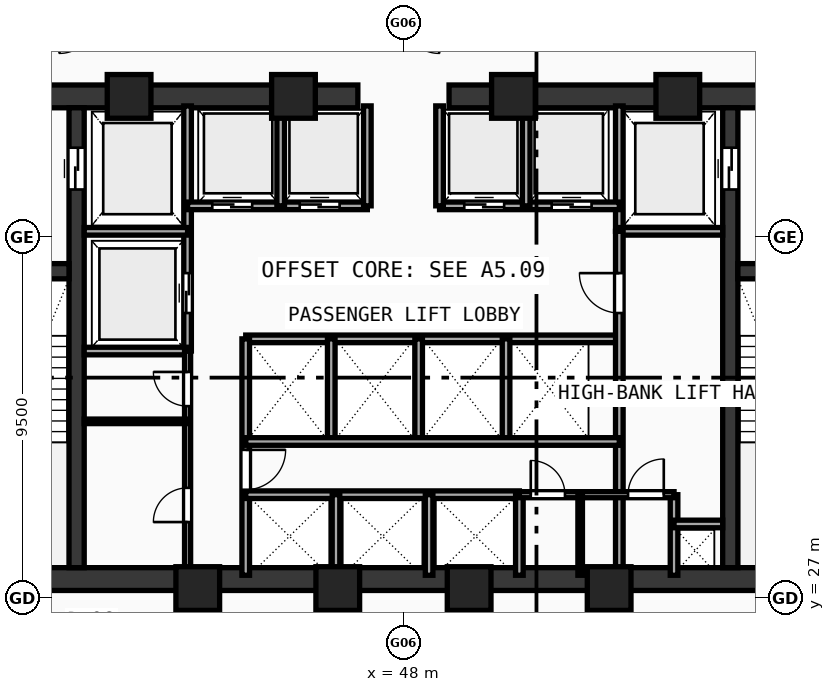
"""IFC4 building model, lengths in metres.
Left out: names, types, materials, properties, quantities, classifications, styles, units other than length and angle.
Written with IfcOpenShell. Run it as: python <this file> out.ifc"""

import sys

from ifc_helpers import new_model, si_unit, direction, frame, frame_2d, origin, origin_with_axes, origin_2d, place, context, subcontext, project, spatial, rectangle, hollow_rectangle, extrude, source, transform, mapped, element, fill, save


model = new_model("IFC4")
c1 = context("Model", 3, precision=1e-05, world=origin(), true_north=direction((0.0, 1.0)))
c2 = subcontext(c1, "Body", "Model", "MODEL_VIEW")
j1 = project(units=[si_unit("LENGTHUNIT", "METRE"), si_unit("PLANEANGLEUNIT", "RADIAN")], contexts=[c1])
p1 = place(None, origin())
s1 = spatial("IfcSite", under=j1, at=p1, CompositionType="ELEMENT")
p2 = place(p1, origin())
s2 = spatial("IfcBuilding", under=s1, at=p2, CompositionType="ELEMENT")
p3 = place(p2, frame((0.0, 0.0, 111.58)))
s3 = spatial("IfcBuildingStorey", under=s2, at=p3, CompositionType="ELEMENT", Elevation=111.58)
p4 = place(p3, frame((35.5, 27.5, 0.0), z_axis=(0.0, 0.0, 1.0), x_axis=(1.0, 0.0, 0.0)))
e1 = element("IfcWall", 1, at=p4, inside=s3, PredefinedType="SHEAR", context=c2, shape_type="SweptSolid", body=[
    extrude(rectangle(XDim=25.0, YDim=0.6, at=frame_2d((12.5, 0.0))), origin(), (0.0, 0.0, 1.0), 3.54),
])
p5 = place(p3, frame((35.5, 40.2, 0.0), z_axis=(0.0, 0.0, 1.0), x_axis=(1.0, 0.0, 0.0)))
e2 = element("IfcWall", 2, at=p5, inside=s3, PredefinedType="SHEAR", context=c2, shape_type="SweptSolid", body=[
    extrude(rectangle(XDim=11.3, YDim=0.6, at=frame_2d((5.65, 0.0))), origin(), (0.0, 0.0, 1.0), 3.54),
])
p6 = place(p5, frame((1.65, 0.0, 0.0)))
e3 = element("IfcOpeningElement", 3, at=p6, cuts=e2, PredefinedType="OPENING", context=c2, shape_type="SweptSolid", body=[
    extrude(rectangle(XDim=1.05, YDim=2.1, at=frame_2d((0.525, 1.05))), frame((0.0, 0.31, 0.0), z_axis=(0.0, -1.0, 0.0), x_axis=(1.0, 0.0, 0.0)), (0.0, 0.0, 1.0), 0.62),
])
p7 = place(p3, frame((49.2, 40.2, 0.0), z_axis=(0.0, 0.0, 1.0), x_axis=(1.0, 0.0, 0.0)))
e4 = element("IfcWall", 4, at=p7, inside=s3, PredefinedType="SHEAR", context=c2, shape_type="SweptSolid", body=[
    extrude(rectangle(XDim=11.3, YDim=0.6, at=frame_2d((5.65, 0.0))), origin(), (0.0, 0.0, 1.0), 3.54),
])
p8 = place(p7, frame((8.6, 0.0, 0.0)))
e5 = element("IfcOpeningElement", 5, at=p8, cuts=e4, PredefinedType="OPENING", context=c2, shape_type="SweptSolid", body=[
    extrude(rectangle(XDim=1.05, YDim=2.1, at=frame_2d((0.525, 1.05))), frame((0.0, 0.31, 0.0), z_axis=(0.0, -1.0, 0.0), x_axis=(1.0, 0.0, 0.0)), (0.0, 0.0, 1.0), 0.62),
])
p9 = place(p3, frame((39.4, 27.8, 0.0), z_axis=(0.0, 0.0, 1.0), x_axis=(0.0, 1.0, 0.0)))
e6 = element("IfcWall", 6, at=p9, inside=s3, PredefinedType="SHEAR", context=c2, shape_type="SweptSolid", body=[
    extrude(rectangle(XDim=12.1, YDim=0.4, at=frame_2d((6.05, 0.0))), origin(), (0.0, 0.0, 1.0), 3.54),
])
p10 = place(p9, frame((9.95, 0.0, 0.0)))
e7 = element("IfcOpeningElement", 7, at=p10, cuts=e6, PredefinedType="OPENING", context=c2, shape_type="SweptSolid", body=[
    extrude(rectangle(XDim=1.1, YDim=2.1, at=frame_2d((0.55, 1.05))), frame((0.0, 0.21, 0.0), z_axis=(0.0, -1.0, 0.0), x_axis=(1.0, 0.0, 0.0)), (0.0, 0.0, 1.0), 0.42),
])
p11 = place(p3, frame((56.6, 27.8, 0.0), z_axis=(0.0, 0.0, 1.0), x_axis=(0.0, 1.0, 0.0)))
e8 = element("IfcWall", 8, at=p11, inside=s3, PredefinedType="SHEAR", context=c2, shape_type="SweptSolid", body=[
    extrude(rectangle(XDim=12.1, YDim=0.4, at=frame_2d((6.05, 0.0))), origin(), (0.0, 0.0, 1.0), 3.54),
])
p12 = place(p11, frame((9.95, 0.0, 0.0)))
e9 = element("IfcOpeningElement", 9, at=p12, cuts=e8, PredefinedType="OPENING", context=c2, shape_type="SweptSolid", body=[
    extrude(rectangle(XDim=1.1, YDim=2.1, at=frame_2d((0.55, 1.05))), frame((0.0, 0.21, 0.0), z_axis=(0.0, -1.0, 0.0), x_axis=(1.0, 0.0, 0.0)), (0.0, 0.0, 1.0), 0.42),
])
p13 = place(p3, frame((36.1, 35.6, 0.0), z_axis=(0.0, 0.0, 1.0), x_axis=(1.0, 0.0, 0.0)))
e10 = element("IfcWall", 10, at=p13, inside=s3, PredefinedType="SHEAR", context=c2, shape_type="SweptSolid", body=[
    extrude(rectangle(XDim=3.1, YDim=0.4, at=frame_2d((1.55, 0.0))), origin(), (0.0, 0.0, 1.0), 3.54),
])
p14 = place(p13, frame((1.02, 0.0, 0.0)))
e11 = element("IfcOpeningElement", 11, at=p14, cuts=e10, PredefinedType="OPENING", context=c2, shape_type="SweptSolid", body=[
    extrude(rectangle(XDim=1.05, YDim=2.1, at=frame_2d((0.525, 1.05))), frame((0.0, 0.21, 0.0), z_axis=(0.0, -1.0, 0.0), x_axis=(1.0, 0.0, 0.0)), (0.0, 0.0, 1.0), 0.42),
])
p15 = place(p3, frame((56.8, 35.6, 0.0), z_axis=(0.0, 0.0, 1.0), x_axis=(1.0, 0.0, 0.0)))
e12 = element("IfcWall", 12, at=p15, inside=s3, PredefinedType="SHEAR", context=c2, shape_type="SweptSolid", body=[
    extrude(rectangle(XDim=3.1, YDim=0.4, at=frame_2d((1.55, 0.0))), origin(), (0.0, 0.0, 1.0), 3.54),
])
p16 = place(p15, frame((1.02, 0.0, 0.0)))
e13 = element("IfcOpeningElement", 13, at=p16, cuts=e12, PredefinedType="OPENING", context=c2, shape_type="SweptSolid", body=[
    extrude(rectangle(XDim=1.05, YDim=2.1, at=frame_2d((0.525, 1.05))), frame((0.0, 0.21, 0.0), z_axis=(0.0, -1.0, 0.0), x_axis=(1.0, 0.0, 0.0)), (0.0, 0.0, 1.0), 0.42),
])
m1 = source(origin(), c2, "Body", "SweptSolid", [
    extrude(hollow_rectangle(XDim=1.15, YDim=1.15, WallThickness=0.048, at=origin_2d()), origin(), (0.0, 0.0, 1.0), 3.8),
])
for number, where, z_axis, x_axis in (
    (14, (42.588, 27.25, -0.26), (0.0, 0.0, 1.0), (1.0, 0.0, 0.0)),
    (15, (46.272, 27.25, -0.26), (0.0, 0.0, 1.0), (1.0, 0.0, 0.0)),
    (16, (49.729, 27.25, -0.26), (0.0, 0.0, 1.0), (1.0, 0.0, 0.0)),
    (17, (53.412, 27.25, -0.26), (0.0, 0.0, 1.0), (1.0, 0.0, 0.0)),
    (18, (55.219, 40.2, -0.26), (0.0, 0.0, 1.0), (1.0, 0.0, 0.0)),
    (19, (50.894, 40.2, -0.26), (0.0, 0.0, 1.0), (1.0, 0.0, 0.0)),
    (20, (45.106, 40.2, -0.26), (0.0, 0.0, 1.0), (1.0, 0.0, 0.0)),
    (21, (40.781, 40.2, -0.26), (0.0, 0.0, 1.0), (1.0, 0.0, 0.0)),
):
    element("IfcColumn", number, at=place(p3, frame(where, z_axis=z_axis, x_axis=x_axis)), inside=s3, PredefinedType="COLUMN", context=c2, shape_type="MappedRepresentation", body=[
        mapped(m1, transform((0.0, 0.0, 0.0), scale=1.0)),
    ])
p17 = place(p3, frame((42.32, 33.5, 0.0), z_axis=(0.0, 0.0, 1.0), x_axis=(0.0, 1.0, 0.0)))
e22 = element("IfcWall", 22, at=p17, inside=s3, PredefinedType="SOLIDWALL", context=c2, shape_type="SweptSolid", body=[
    extrude(rectangle(XDim=6.45, YDim=0.2, at=frame_2d((3.225, 0.0))), origin(), (0.0, 0.0, 1.0), 3.54),
])
p18 = place(p17, frame((1.0, 0.0, 0.0)))
e23 = element("IfcOpeningElement", 23, at=p18, cuts=e22, PredefinedType="OPENING", context=c2, shape_type="SweptSolid", body=[
    extrude(rectangle(XDim=1.05, YDim=2.1, at=frame_2d((0.525, 1.05))), frame((0.0, 0.11, 0.0), z_axis=(0.0, -1.0, 0.0), x_axis=(1.0, 0.0, 0.0)), (0.0, 0.0, 1.0), 0.22),
])
for number, where, z_axis, x_axis in (
    (24, (39.6, 36.65, 0.0), (0.0, 0.0, 1.0), (1.0, 0.0, 0.0)),
    (25, (39.6, 33.5, 0.0), (0.0, 0.0, 1.0), (1.0, 0.0, 0.0)),
):
    element("IfcWall", number, at=place(p3, frame(where, z_axis=z_axis, x_axis=x_axis)), inside=s3, PredefinedType="SOLIDWALL", context=c2, shape_type="SweptSolid", body=[
        extrude(rectangle(XDim=2.72, YDim=0.2, at=frame_2d((1.36, 0.0))), origin(), (0.0, 0.0, 1.0), 3.54),
    ])
p19 = place(p3, frame((53.68, 36.65, 0.0), z_axis=(0.0, 0.0, 1.0), x_axis=(0.0, 1.0, 0.0)))
e26 = element("IfcWall", 26, at=p19, inside=s3, PredefinedType="SOLIDWALL", context=c2, shape_type="SweptSolid", body=[
    extrude(rectangle(XDim=3.3, YDim=0.2, at=frame_2d((1.65, 0.0))), origin(), (0.0, 0.0, 1.0), 3.54),
])
p20 = place(p3, frame((53.68, 36.65, 0.0), z_axis=(0.0, 0.0, 1.0), x_axis=(1.0, 0.0, 0.0)))
e27 = element("IfcWall", 27, at=p20, inside=s3, PredefinedType="SOLIDWALL", context=c2, shape_type="SweptSolid", body=[
    extrude(rectangle(XDim=2.72, YDim=0.2, at=frame_2d((1.36, 0.0))), origin(), (0.0, 0.0, 1.0), 3.54),
])
p21 = place(p3, frame((42.32, 37.32, 0.0), z_axis=(0.0, 0.0, 1.0), x_axis=(1.0, 0.0, 0.0)))
e28 = element("IfcWall", 28, at=p21, inside=s3, PredefinedType="SOLIDWALL", context=c2, shape_type="SweptSolid", body=[
    extrude(rectangle(XDim=4.73, YDim=0.2, at=frame_2d((2.365, 0.0))), origin(), (0.0, 0.0, 1.0), 3.54),
])
p22 = place(p21, frame((0.65, 0.0, 0.0)))
e29 = element("IfcOpeningElement", 29, at=p22, cuts=e28, PredefinedType="OPENING", context=c2, shape_type="SweptSolid", body=[
    extrude(rectangle(XDim=1.05, YDim=2.1, at=frame_2d((0.525, 1.05))), frame((0.0, 0.11, 0.0), z_axis=(0.0, -1.0, 0.0), x_axis=(1.0, 0.0, 0.0)), (0.0, 0.0, 1.0), 0.22),
])
p23 = place(p21, frame((2.95, 0.0, 0.0)))
e30 = element("IfcOpeningElement", 30, at=p23, cuts=e28, PredefinedType="OPENING", context=c2, shape_type="SweptSolid", body=[
    extrude(rectangle(XDim=1.05, YDim=2.1, at=frame_2d((0.525, 1.05))), frame((0.0, 0.11, 0.0), z_axis=(0.0, -1.0, 0.0), x_axis=(1.0, 0.0, 0.0)), (0.0, 0.0, 1.0), 0.22),
])
p24 = place(p3, frame((48.95, 37.32, 0.0), z_axis=(0.0, 0.0, 1.0), x_axis=(1.0, 0.0, 0.0)))
e31 = element("IfcWall", 31, at=p24, inside=s3, PredefinedType="SOLIDWALL", context=c2, shape_type="SweptSolid", body=[
    extrude(rectangle(XDim=4.73, YDim=0.2, at=frame_2d((2.365, 0.0))), origin(), (0.0, 0.0, 1.0), 3.54),
])
p25 = place(p24, frame((0.65, 0.0, 0.0)))
e32 = element("IfcOpeningElement", 32, at=p25, cuts=e31, PredefinedType="OPENING", context=c2, shape_type="SweptSolid", body=[
    extrude(rectangle(XDim=1.05, YDim=2.1, at=frame_2d((0.525, 1.05))), frame((0.0, 0.11, 0.0), z_axis=(0.0, -1.0, 0.0), x_axis=(1.0, 0.0, 0.0)), (0.0, 0.0, 1.0), 0.22),
])
p26 = place(p24, frame((2.95, 0.0, 0.0)))
e33 = element("IfcOpeningElement", 33, at=p26, cuts=e31, PredefinedType="OPENING", context=c2, shape_type="SweptSolid", body=[
    extrude(rectangle(XDim=1.05, YDim=2.1, at=frame_2d((0.525, 1.05))), frame((0.0, 0.11, 0.0), z_axis=(0.0, -1.0, 0.0), x_axis=(1.0, 0.0, 0.0)), (0.0, 0.0, 1.0), 0.22),
])
for number, where, z_axis, x_axis in (
    (34, (47.05, 37.32, 0.0), (0.0, 0.0, 1.0), (0.0, 1.0, 0.0)),
    (35, (48.95, 37.32, 0.0), (0.0, 0.0, 1.0), (0.0, 1.0, 0.0)),
    (36, (44.77, 37.32, 0.0), (0.0, 0.0, 1.0), (0.0, 1.0, 0.0)),
    (37, (51.23, 37.32, 0.0), (0.0, 0.0, 1.0), (0.0, 1.0, 0.0)),
):
    element("IfcWall", number, at=place(p3, frame(where, z_axis=z_axis, x_axis=x_axis)), inside=s3, PredefinedType="SOLIDWALL", context=c2, shape_type="SweptSolid", body=[
        extrude(rectangle(XDim=2.63, YDim=0.2, at=frame_2d((1.315, 0.0))), origin(), (0.0, 0.0, 1.0), 3.54),
    ])
p27 = place(p3, frame((43.85, 33.82, 0.0), z_axis=(0.0, 0.0, 1.0), x_axis=(1.0, 0.0, 0.0)))
e38 = element("IfcWall", 38, at=p27, inside=s3, PredefinedType="SOLIDWALL", context=c2, shape_type="SweptSolid", body=[
    extrude(rectangle(XDim=9.83, YDim=0.2, at=frame_2d((4.915, 0.0))), origin(), (0.0, 0.0, 1.0), 3.54),
])
p28 = place(p3, frame((43.85, 27.6, 0.0), z_axis=(0.0, 0.0, 1.0), x_axis=(0.0, 1.0, 0.0)))
e39 = element("IfcWall", 39, at=p28, inside=s3, PredefinedType="SOLIDWALL", context=c2, shape_type="SweptSolid", body=[
    extrude(rectangle(XDim=6.22, YDim=0.2, at=frame_2d((3.11, 0.0))), origin(), (0.0, 0.0, 1.0), 3.54),
])
p29 = place(p28, frame((2.25, 0.0, 0.0)))
e40 = element("IfcOpeningElement", 40, at=p29, cuts=e39, PredefinedType="OPENING", context=c2, shape_type="SweptSolid", body=[
    extrude(rectangle(XDim=1.05, YDim=2.1, at=frame_2d((0.525, 1.05))), frame((0.0, 0.11, 0.0), z_axis=(0.0, -1.0, 0.0), x_axis=(1.0, 0.0, 0.0)), (0.0, 0.0, 1.0), 0.22),
])
p30 = place(p3, frame((53.68, 27.6, 0.0), z_axis=(0.0, 0.0, 1.0), x_axis=(0.0, 1.0, 0.0)))
e41 = element("IfcWall", 41, at=p30, inside=s3, PredefinedType="SOLIDWALL", context=c2, shape_type="SweptSolid", body=[
    extrude(rectangle(XDim=9.05, YDim=0.2, at=frame_2d((4.525, 0.0))), origin(), (0.0, 0.0, 1.0), 3.54),
])
p31 = place(p30, frame((6.9, 0.0, 0.0)))
e42 = element("IfcOpeningElement", 42, at=p31, cuts=e41, PredefinedType="OPENING", context=c2, shape_type="SweptSolid", body=[
    extrude(rectangle(XDim=1.05, YDim=2.1, at=frame_2d((0.525, 1.05))), frame((0.0, 0.11, 0.0), z_axis=(0.0, -1.0, 0.0), x_axis=(1.0, 0.0, 0.0)), (0.0, 0.0, 1.0), 0.22),
])
for number, where, z_axis, x_axis in (
    (43, (46.1, 31.12, 0.0), (0.0, 0.0, 1.0), (0.0, 1.0, 0.0)),
    (44, (48.4, 31.12, 0.0), (0.0, 0.0, 1.0), (0.0, 1.0, 0.0)),
    (45, (50.7, 31.12, 0.0), (0.0, 0.0, 1.0), (0.0, 1.0, 0.0)),
):
    element("IfcWall", number, at=place(p3, frame(where, z_axis=z_axis, x_axis=x_axis)), inside=s3, PredefinedType="SOLIDWALL", context=c2, shape_type="SweptSolid", body=[
        extrude(rectangle(XDim=2.7, YDim=0.2, at=frame_2d((1.35, 0.0))), origin(), (0.0, 0.0, 1.0), 3.54),
    ])
p32 = place(p3, frame((43.85, 29.72, 0.0), z_axis=(0.0, 0.0, 1.0), x_axis=(1.0, 0.0, 0.0)))
e46 = element("IfcWall", 46, at=p32, inside=s3, PredefinedType="SOLIDWALL", context=c2, shape_type="SweptSolid", body=[
    extrude(rectangle(XDim=7.2, YDim=0.2, at=frame_2d((3.6, 0.0))), origin(), (0.0, 0.0, 1.0), 3.54),
])
p33 = place(p3, frame((51.05, 27.6, 0.0), z_axis=(0.0, 0.0, 1.0), x_axis=(0.0, 1.0, 0.0)))
e47 = element("IfcWall", 47, at=p33, inside=s3, PredefinedType="SOLIDWALL", context=c2, shape_type="SweptSolid", body=[
    extrude(rectangle(XDim=2.12, YDim=0.2, at=frame_2d((1.06, 0.0))), origin(), (0.0, 0.0, 1.0), 3.54),
])
p34 = place(p3, frame((43.85, 31.12, 0.0), z_axis=(0.0, 0.0, 1.0), x_axis=(1.0, 0.0, 0.0)))
e48 = element("IfcWall", 48, at=p34, inside=s3, PredefinedType="SOLIDWALL", context=c2, shape_type="SweptSolid", body=[
    extrude(rectangle(XDim=9.83, YDim=0.2, at=frame_2d((4.915, 0.0))), origin(), (0.0, 0.0, 1.0), 3.54),
])
for number, where, z_axis, x_axis in (
    (49, (46.225, 27.6, 0.0), (0.0, 0.0, 1.0), (0.0, 1.0, 0.0)),
    (50, (48.675, 27.6, 0.0), (0.0, 0.0, 1.0), (0.0, 1.0, 0.0)),
    (51, (55.12, 27.6, 0.0), (0.0, 0.0, 1.0), (0.0, 1.0, 0.0)),
):
    element("IfcWall", number, at=place(p3, frame(where, z_axis=z_axis, x_axis=x_axis)), inside=s3, PredefinedType="SOLIDWALL", context=c2, shape_type="SweptSolid", body=[
        extrude(rectangle(XDim=2.12, YDim=0.2, at=frame_2d((1.06, 0.0))), origin(), (0.0, 0.0, 1.0), 3.54),
    ])
p35 = place(p3, frame((55.12, 28.95, 0.0), z_axis=(0.0, 0.0, 1.0), x_axis=(1.0, 0.0, 0.0)))
e52 = element("IfcWall", 52, at=p35, inside=s3, PredefinedType="SOLIDWALL", context=c2, shape_type="SweptSolid", body=[
    extrude(rectangle(XDim=1.28, YDim=0.2, at=frame_2d((0.64, 0.0))), origin(), (0.0, 0.0, 1.0), 3.54),
])
p36 = place(p3, frame((42.32, 27.6, 0.0), z_axis=(0.0, 0.0, 1.0), x_axis=(0.0, 1.0, 0.0)))
e53 = element("IfcWall", 53, at=p36, inside=s3, PredefinedType="PARTITIONING", context=c2, shape_type="SweptSolid", body=[
    extrude(rectangle(XDim=5.9, YDim=0.16, at=frame_2d((2.95, 0.0))), origin(), (0.0, 0.0, 1.0), 3.54),
])
p37 = place(p36, frame((1.4, 0.0, 0.0)))
e54 = element("IfcOpeningElement", 54, at=p37, cuts=e53, PredefinedType="OPENING", context=c2, shape_type="SweptSolid", body=[
    extrude(rectangle(XDim=0.9, YDim=2.1, at=frame_2d((0.45, 1.05))), frame((0.0, 0.09, 0.0), z_axis=(0.0, -1.0, 0.0), x_axis=(1.0, 0.0, 0.0)), (0.0, 0.0, 1.0), 0.18),
])
p38 = place(p36, frame((4.45, 0.0, 0.0)))
e55 = element("IfcOpeningElement", 55, at=p38, cuts=e53, PredefinedType="OPENING", context=c2, shape_type="SweptSolid", body=[
    extrude(rectangle(XDim=0.9, YDim=2.1, at=frame_2d((0.45, 1.05))), frame((0.0, 0.09, 0.0), z_axis=(0.0, -1.0, 0.0), x_axis=(1.0, 0.0, 0.0)), (0.0, 0.0, 1.0), 0.18),
])
p39 = place(p3, frame((51.05, 29.72, 0.0), z_axis=(0.0, 0.0, 1.0), x_axis=(1.0, 0.0, 0.0)))
e56 = element("IfcWall", 56, at=p39, inside=s3, PredefinedType="PARTITIONING", context=c2, shape_type="SweptSolid", body=[
    extrude(rectangle(XDim=4.07, YDim=0.16, at=frame_2d((2.035, 0.0))), origin(), (0.0, 0.0, 1.0), 3.54),
])
p40 = place(p39, frame((0.3, 0.0, 0.0)))
e57 = element("IfcOpeningElement", 57, at=p40, cuts=e56, PredefinedType="OPENING", context=c2, shape_type="SweptSolid", body=[
    extrude(rectangle(XDim=0.9, YDim=2.1, at=frame_2d((0.45, 1.05))), frame((0.0, 0.09, 0.0), z_axis=(0.0, -1.0, 0.0), x_axis=(1.0, 0.0, 0.0)), (0.0, 0.0, 1.0), 0.18),
])
p41 = place(p39, frame((2.86, 0.0, 0.0)))
e58 = element("IfcOpeningElement", 58, at=p41, cuts=e56, PredefinedType="OPENING", context=c2, shape_type="SweptSolid", body=[
    extrude(rectangle(XDim=0.94, YDim=2.1, at=frame_2d((0.47, 1.05))), frame((0.0, 0.09, 0.0), z_axis=(0.0, -1.0, 0.0), x_axis=(1.0, 0.0, 0.0)), (0.0, 0.0, 1.0), 0.18),
])
p42 = place(p3, frame((39.6, 31.65, 0.0), z_axis=(0.0, 0.0, 1.0), x_axis=(1.0, 0.0, 0.0)))
e59 = element("IfcWall", 59, at=p42, inside=s3, PredefinedType="PARTITIONING", context=c2, shape_type="SweptSolid", body=[
    extrude(rectangle(XDim=2.72, YDim=0.12, at=frame_2d((1.36, 0.0))), origin(), (0.0, 0.0, 1.0), 3.54),
])
p43 = place(p3, frame((52.65, 27.6, 0.0), z_axis=(0.0, 0.0, 1.0), x_axis=(0.0, 1.0, 0.0)))
e60 = element("IfcWall", 60, at=p43, inside=s3, PredefinedType="PARTITIONING", context=c2, shape_type="SweptSolid", body=[
    extrude(rectangle(XDim=2.12, YDim=0.12, at=frame_2d((1.06, 0.0))), origin(), (0.0, 0.0, 1.0), 3.54),
])
m2 = source(origin(), c2, "Body", "SweptSolid", [
    extrude(rectangle(XDim=1.1, YDim=2.1, at=frame_2d((0.55, 1.05))), frame((0.0, 0.025, 0.0), z_axis=(0.0, -1.0, 0.0), x_axis=(1.0, 0.0, 0.0)), (0.0, 0.0, 1.0), 0.05),
])
p44 = place(p10, frame((1.1, 0.0, 0.0), z_axis=(0.0, 0.0, 1.0), x_axis=(-1.0, 0.0, 0.0)))
e61 = element("IfcDoor", 61, at=p44, inside=s3, OperationType="DOUBLE_DOOR_SLIDING", PredefinedType="DOOR", context=c2, shape_type="MappedRepresentation", body=[
    mapped(m2, transform((0.0, 0.0, 0.0), scale=1.0)),
])
fill(e7, e61)
p45 = place(p12, origin_with_axes())
e62 = element("IfcDoor", 62, at=p45, inside=s3, OperationType="DOUBLE_DOOR_SLIDING", PredefinedType="DOOR", context=c2, shape_type="MappedRepresentation", body=[
    mapped(m2, transform((0.0, 0.0, 0.0), scale=1.0)),
])
fill(e9, e62)
m3 = source(origin(), c2, "Body", "SweptSolid", [
    extrude(rectangle(XDim=1.05, YDim=2.1, at=frame_2d((0.525, 1.05))), frame((0.0, 0.025, 0.0), z_axis=(0.0, -1.0, 0.0), x_axis=(1.0, 0.0, 0.0)), (0.0, 0.0, 1.0), 0.05),
])
p46 = place(p18, origin_with_axes())
e63 = element("IfcDoor", 63, at=p46, inside=s3, OperationType="DOUBLE_DOOR_SLIDING", PredefinedType="DOOR", context=c2, shape_type="MappedRepresentation", body=[
    mapped(m3, transform((0.0, 0.0, 0.0), scale=1.0)),
])
fill(e23, e63)
p47 = place(p22, frame((1.05, 0.0, 0.0), z_axis=(0.0, 0.0, 1.0), x_axis=(-1.0, 0.0, 0.0)))
e64 = element("IfcDoor", 64, at=p47, inside=s3, OperationType="DOUBLE_DOOR_SLIDING", PredefinedType="DOOR", context=c2, shape_type="MappedRepresentation", body=[
    mapped(m3, transform((0.0, 0.0, 0.0), scale=1.0)),
])
fill(e29, e64)
p48 = place(p23, frame((1.05, 0.0, 0.0), z_axis=(0.0, 0.0, 1.0), x_axis=(-1.0, 0.0, 0.0)))
e65 = element("IfcDoor", 65, at=p48, inside=s3, OperationType="DOUBLE_DOOR_SLIDING", PredefinedType="DOOR", context=c2, shape_type="MappedRepresentation", body=[
    mapped(m3, transform((0.0, 0.0, 0.0), scale=1.0)),
])
fill(e30, e65)
p49 = place(p25, frame((1.05, 0.0, 0.0), z_axis=(0.0, 0.0, 1.0), x_axis=(-1.0, 0.0, 0.0)))
e66 = element("IfcDoor", 66, at=p49, inside=s3, OperationType="DOUBLE_DOOR_SLIDING", PredefinedType="DOOR", context=c2, shape_type="MappedRepresentation", body=[
    mapped(m3, transform((0.0, 0.0, 0.0), scale=1.0)),
])
fill(e32, e66)
p50 = place(p26, frame((1.05, 0.0, 0.0), z_axis=(0.0, 0.0, 1.0), x_axis=(-1.0, 0.0, 0.0)))
e67 = element("IfcDoor", 67, at=p50, inside=s3, OperationType="DOUBLE_DOOR_SLIDING", PredefinedType="DOOR", context=c2, shape_type="MappedRepresentation", body=[
    mapped(m3, transform((0.0, 0.0, 0.0), scale=1.0)),
])
fill(e33, e67)
p51 = place(p29, frame((1.05, 0.0, 0.0), z_axis=(0.0, 0.0, 1.0), x_axis=(-1.0, 0.0, 0.0)))
e68 = element("IfcDoor", 68, at=p51, inside=s3, OperationType="SINGLE_SWING_LEFT", PredefinedType="DOOR", context=c2, shape_type="MappedRepresentation", body=[
    mapped(m3, transform((0.0, 0.0, 0.0), scale=1.0)),
])
fill(e40, e68)
p52 = place(p31, origin_with_axes())
e69 = element("IfcDoor", 69, at=p52, inside=s3, OperationType="SINGLE_SWING_RIGHT", PredefinedType="DOOR", context=c2, shape_type="MappedRepresentation", body=[
    mapped(m3, transform((0.0, 0.0, 0.0), scale=1.0)),
])
fill(e42, e69)
m4 = source(origin(), c2, "Body", "SweptSolid", [
    extrude(rectangle(XDim=0.9, YDim=2.1, at=frame_2d((0.45, 1.05))), frame((0.0, 0.025, 0.0), z_axis=(0.0, -1.0, 0.0), x_axis=(1.0, 0.0, 0.0)), (0.0, 0.0, 1.0), 0.05),
])
p53 = place(p37, origin_with_axes())
e70 = element("IfcDoor", 70, at=p53, inside=s3, OperationType="SINGLE_SWING_LEFT", PredefinedType="DOOR", context=c2, shape_type="MappedRepresentation", body=[
    mapped(m4, transform((0.0, 0.0, 0.0), scale=1.0)),
])
fill(e54, e70)
p54 = place(p38, origin_with_axes())
e71 = element("IfcDoor", 71, at=p54, inside=s3, OperationType="SINGLE_SWING_RIGHT", PredefinedType="DOOR", context=c2, shape_type="MappedRepresentation", body=[
    mapped(m4, transform((0.0, 0.0, 0.0), scale=1.0)),
])
fill(e55, e71)
p55 = place(p40, origin_with_axes())
e72 = element("IfcDoor", 72, at=p55, inside=s3, OperationType="SINGLE_SWING_LEFT", PredefinedType="DOOR", context=c2, shape_type="MappedRepresentation", body=[
    mapped(m4, transform((0.0, 0.0, 0.0), scale=1.0)),
])
fill(e57, e72)
m5 = source(origin(), c2, "Body", "SweptSolid", [
    extrude(rectangle(XDim=0.94, YDim=2.1, at=frame_2d((0.47, 1.05))), frame((0.0, 0.025, 0.0), z_axis=(0.0, -1.0, 0.0), x_axis=(1.0, 0.0, 0.0)), (0.0, 0.0, 1.0), 0.05),
])
p56 = place(p41, origin_with_axes())
e73 = element("IfcDoor", 73, at=p56, inside=s3, OperationType="SINGLE_SWING_RIGHT", PredefinedType="DOOR", context=c2, shape_type="MappedRepresentation", body=[
    mapped(m5, transform((0.0, 0.0, 0.0), scale=1.0)),
])
fill(e58, e73)
save(model, sys.argv[1])
